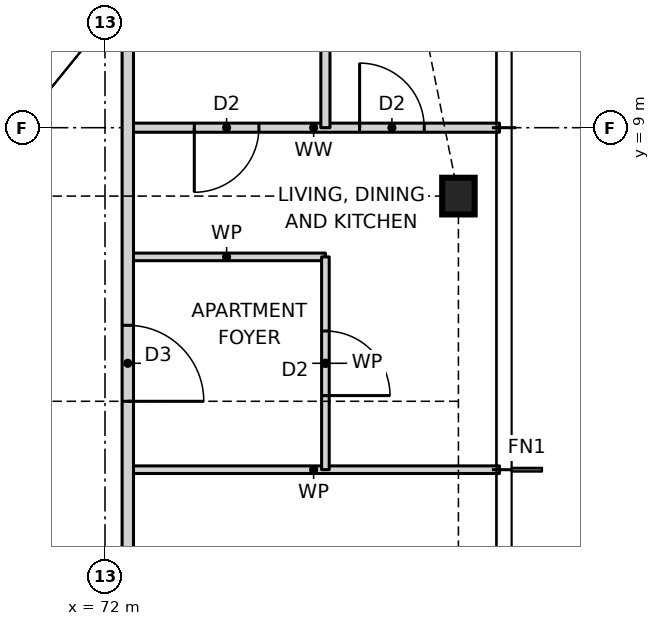
"""IFC4 building model, lengths in metres.
Left out: names, types, materials, properties, quantities, classifications, styles, units other than length and angle.
Written with IfcOpenShell. Run it as: python <this file> out.ifc"""

import sys

from ifc_helpers import new_model, si_unit, direction, frame, frame_2d, origin, origin_2d, place, context, subcontext, project, spatial, rectangle, i_section, extrude, element, fill, save


model = new_model("IFC4")
c1 = context("Model", 3, precision=1e-05, world=origin(), true_north=direction((0.0, 1.0)))
c2 = subcontext(c1, "Body", "Model", "MODEL_VIEW")
j1 = project(units=[si_unit("LENGTHUNIT", "METRE"), si_unit("PLANEANGLEUNIT", "RADIAN")], contexts=[c1])
p1 = place(None, origin())
s1 = spatial("IfcSite", under=j1, at=p1, CompositionType="ELEMENT")
p2 = place(p1, origin())
s2 = spatial("IfcBuilding", under=s1, at=p2, CompositionType="ELEMENT")
p3 = place(p2, frame((0.0, 0.0, 105.0)))
s3 = spatial("IfcBuildingStorey", under=s2, at=p3, CompositionType="ELEMENT", Elevation=105.0)
p4 = place(p3, frame((76.65, 8.1, 0.0), z_axis=(0.0, 0.0, 1.0), x_axis=(1.0, 0.0, 0.0)))
e1 = element("IfcColumn", 1, at=p4, inside=s3, PredefinedType="COLUMN", context=c2, shape_type="SweptSolid", body=[
    extrude(i_section(OverallWidth=0.427, OverallDepth=0.483, WebThickness=0.051, FlangeThickness=0.082, at=origin_2d()), origin(), (0.0, 0.0, 1.0), 3.5),
])
p5 = place(p3, frame((72.3, 4.5, 0.0), z_axis=(0.0, 0.0, 1.0), x_axis=(1.0, 0.0, 0.0)))
e2 = element("IfcWall", 2, at=p5, inside=s3, PredefinedType="PARTITIONING", context=c2, shape_type="SweptSolid", body=[
    extrude(rectangle(XDim=4.89, YDim=0.1, at=frame_2d((2.445, 0.0))), origin(), (0.0, 0.0, 1.0), 3.27),
])
p6 = place(p3, frame((72.3, 7.3, 0.0), z_axis=(0.0, 0.0, 1.0), x_axis=(1.0, 0.0, 0.0)))
e3 = element("IfcWall", 3, at=p6, inside=s3, PredefinedType="PARTITIONING", context=c2, shape_type="SweptSolid", body=[
    extrude(rectangle(XDim=2.6, YDim=0.1, at=frame_2d((1.3, 0.0))), origin(), (0.0, 0.0, 1.0), 3.27),
])
p7 = place(p3, frame((72.3, 9.0, 0.0), z_axis=(0.0, 0.0, 1.0), x_axis=(1.0, 0.0, 0.0)))
e4 = element("IfcWall", 4, at=p7, inside=s3, PredefinedType="PARTITIONING", context=c2, shape_type="SweptSolid", body=[
    extrude(rectangle(XDim=4.89, YDim=0.12, at=frame_2d((2.445, 0.0))), origin(), (0.0, 0.0, 1.0), 3.27),
])
p8 = place(p7, frame((0.875, 0.0, 0.0)))
e5 = element("IfcOpeningElement", 5, at=p8, cuts=e4, PredefinedType="OPENING", context=c2, shape_type="SweptSolid", body=[
    extrude(rectangle(XDim=0.85, YDim=2.1, at=frame_2d((0.425, 1.05))), frame((0.0, 0.07, 0.0), z_axis=(0.0, -1.0, 0.0), x_axis=(1.0, 0.0, 0.0)), (0.0, 0.0, 1.0), 0.14),
])
p9 = place(p7, frame((3.05, 0.0, 0.0)))
e6 = element("IfcOpeningElement", 6, at=p9, cuts=e4, PredefinedType="OPENING", context=c2, shape_type="SweptSolid", body=[
    extrude(rectangle(XDim=0.85, YDim=2.1, at=frame_2d((0.425, 1.05))), frame((0.0, 0.07, 0.0), z_axis=(0.0, -1.0, 0.0), x_axis=(1.0, 0.0, 0.0)), (0.0, 0.0, 1.0), 0.14),
])
p10 = place(p3, frame((74.9, 4.5, 0.0), z_axis=(0.0, 0.0, 1.0), x_axis=(0.0, 1.0, 0.0)))
e7 = element("IfcWall", 7, at=p10, inside=s3, PredefinedType="PARTITIONING", context=c2, shape_type="SweptSolid", body=[
    extrude(rectangle(XDim=2.8, YDim=0.1, at=frame_2d((1.4, 0.0))), origin(), (0.0, 0.0, 1.0), 3.27),
])
p11 = place(p10, frame((0.975, 0.0, 0.0)))
e8 = element("IfcOpeningElement", 8, at=p11, cuts=e7, PredefinedType="OPENING", context=c2, shape_type="SweptSolid", body=[
    extrude(rectangle(XDim=0.85, YDim=2.1, at=frame_2d((0.425, 1.05))), frame((0.0, 0.06, 0.0), z_axis=(0.0, -1.0, 0.0), x_axis=(1.0, 0.0, 0.0)), (0.0, 0.0, 1.0), 0.12),
])
p12 = place(p3, frame((74.9, 9.0, 0.0), z_axis=(0.0, 0.0, 1.0), x_axis=(0.0, 1.0, 0.0)))
e9 = element("IfcWall", 9, at=p12, inside=s3, PredefinedType="PARTITIONING", context=c2, shape_type="SweptSolid", body=[
    extrude(rectangle(XDim=2.4, YDim=0.12, at=frame_2d((1.2, 0.0))), origin(), (0.0, 0.0, 1.0), 3.27),
])
p13 = place(p3, frame((72.3, -10.768, 0.0), z_axis=(0.0, 0.0, 1.0), x_axis=(0.0, 1.0, 0.0)))
e10 = element("IfcWall", 10, at=p13, inside=s3, PredefinedType="PARTITIONING", context=c2, shape_type="SweptSolid", body=[
    extrude(rectangle(XDim=21.668, YDim=0.15, at=frame_2d((10.834, 0.0))), origin(), (0.0, 0.0, 1.0), 3.27),
])
p14 = place(p13, frame((6.268, 0.0, 0.0)))
e11 = element("IfcOpeningElement", 11, at=p14, cuts=e10, PredefinedType="OPENING", context=c2, shape_type="SweptSolid", body=[
    extrude(rectangle(XDim=1.0, YDim=2.1, at=frame_2d((0.5, 1.05))), frame((0.0, 0.085, 0.0), z_axis=(0.0, -1.0, 0.0), x_axis=(1.0, 0.0, 0.0)), (0.0, 0.0, 1.0), 0.17),
])
p15 = place(p13, frame((16.168, 0.0, 0.0)))
e12 = element("IfcOpeningElement", 12, at=p15, cuts=e10, PredefinedType="OPENING", context=c2, shape_type="SweptSolid", body=[
    extrude(rectangle(XDim=1.0, YDim=2.1, at=frame_2d((0.5, 1.05))), frame((0.0, 0.085, 0.0), z_axis=(0.0, -1.0, 0.0), x_axis=(1.0, 0.0, 0.0)), (0.0, 0.0, 1.0), 0.17),
])
p16 = place(p15, frame((1.0, 0.0, 0.0), z_axis=(0.0, 0.0, 1.0), x_axis=(-1.0, 0.0, 0.0)))
e13 = element("IfcDoor", 13, at=p16, inside=s3, OperationType="SINGLE_SWING_RIGHT", PredefinedType="DOOR", context=c2, shape_type="SweptSolid", body=[
    extrude(rectangle(XDim=1.0, YDim=2.1, at=frame_2d((0.5, 1.05))), frame((0.0, 0.025, 0.0), z_axis=(0.0, -1.0, 0.0), x_axis=(1.0, 0.0, 0.0)), (0.0, 0.0, 1.0), 0.05),
])
fill(e12, e13)
p17 = place(p11, frame((0.85, 0.0, 0.0), z_axis=(0.0, 0.0, 1.0), x_axis=(-1.0, 0.0, 0.0)))
e14 = element("IfcDoor", 14, at=p17, inside=s3, OperationType="SINGLE_SWING_RIGHT", PredefinedType="DOOR", context=c2, shape_type="SweptSolid", body=[
    extrude(rectangle(XDim=0.85, YDim=2.1, at=frame_2d((0.425, 1.05))), frame((0.0, 0.025, 0.0), z_axis=(0.0, -1.0, 0.0), x_axis=(1.0, 0.0, 0.0)), (0.0, 0.0, 1.0), 0.05),
])
fill(e8, e14)
p18 = place(p8, frame((0.85, 0.0, 0.0), z_axis=(0.0, 0.0, 1.0), x_axis=(-1.0, 0.0, 0.0)))
e15 = element("IfcDoor", 15, at=p18, inside=s3, OperationType="SINGLE_SWING_RIGHT", PredefinedType="DOOR", context=c2, shape_type="SweptSolid", body=[
    extrude(rectangle(XDim=0.85, YDim=2.1, at=frame_2d((0.425, 1.05))), frame((0.0, 0.025, 0.0), z_axis=(0.0, -1.0, 0.0), x_axis=(1.0, 0.0, 0.0)), (0.0, 0.0, 1.0), 0.05),
])
fill(e5, e15)
p19 = place(p9, origin())
e16 = element("IfcDoor", 16, at=p19, inside=s3, OperationType="SINGLE_SWING_LEFT", PredefinedType="DOOR", context=c2, shape_type="SweptSolid", body=[
    extrude(rectangle(XDim=0.85, YDim=2.1, at=frame_2d((0.425, 1.05))), frame((0.0, 0.025, 0.0), z_axis=(0.0, -1.0, 0.0), x_axis=(1.0, 0.0, 0.0)), (0.0, 0.0, 1.0), 0.05),
])
fill(e6, e16)
save(model, sys.argv[1])
